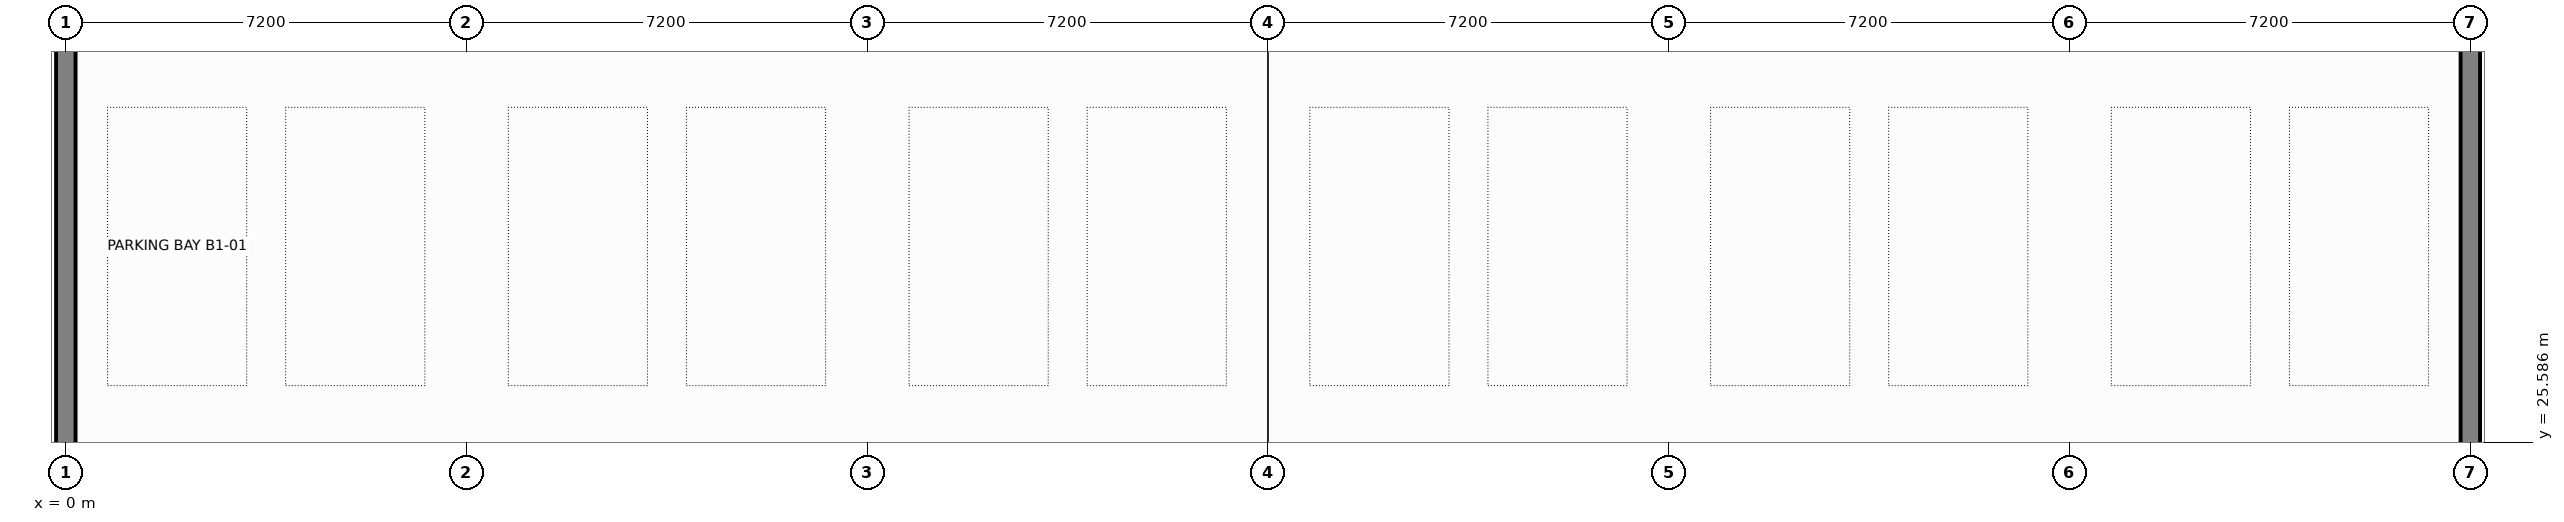
"""IFC4 building model, lengths in metres.
Left out: names, types, materials, properties, quantities, classifications, styles, units other than length and angle.
Written with IfcOpenShell. Run it as: python <this file> out.ifc"""

import sys

from ifc_helpers import new_model, si_unit, direction, frame, frame_2d, origin, place, context, subcontext, project, spatial, rectangle, extrude, element, save


model = new_model("IFC4")
c1 = context("Model", 3, precision=1e-05, world=origin(), true_north=direction((0.0, 1.0)))
c2 = subcontext(c1, "Body", "Model", "MODEL_VIEW")
j1 = project(units=[si_unit("LENGTHUNIT", "METRE"), si_unit("PLANEANGLEUNIT", "RADIAN")], contexts=[c1])
p1 = place(None, origin())
s1 = spatial("IfcSite", under=j1, at=p1, CompositionType="ELEMENT")
p2 = place(p1, origin())
s2 = spatial("IfcBuilding", under=s1, at=p2, CompositionType="ELEMENT")
p3 = place(p2, frame((0.0, 0.0, -4.2)))
s3 = spatial("IfcBuildingStorey", under=s2, at=p3, CompositionType="ELEMENT", Elevation=-4.2)
for number, where, z_axis, x_axis in (
    (1, (0.0, 25.2, 0.0), (0.0, 0.0, 1.0), (0.0, 1.0, 0.0)),
    (2, (43.2, 25.2, 0.0), (0.0, 0.0, 1.0), (0.0, 1.0, 0.0)),
):
    element("IfcWall", number, at=place(p3, frame(where, z_axis=z_axis, x_axis=x_axis)), inside=s3, PredefinedType="USERDEFINED", context=c2, shape_type="SweptSolid", body=[
        extrude(rectangle(XDim=8.4, YDim=0.35, at=frame_2d((4.2, 0.0))), origin(), (0.0, 0.0, 1.0), 3.96),
    ])
save(model, sys.argv[1])
